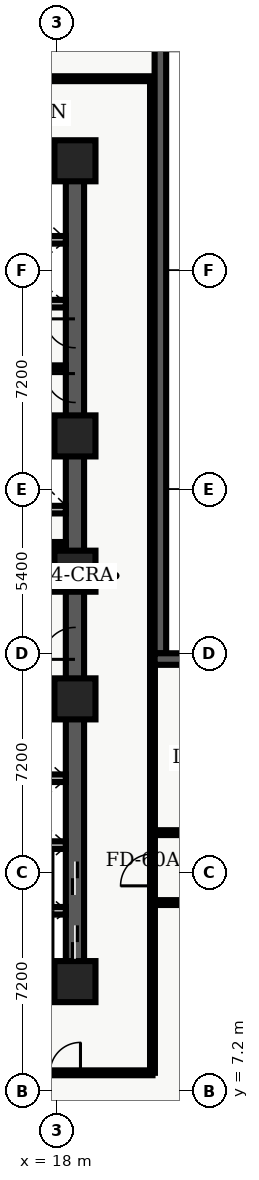
"""IFC4 building model, lengths in metres.
Left out: names, types, materials, properties, quantities, classifications, styles, units other than length and angle.
Written with IfcOpenShell. Run it as: python <this file> out.ifc"""

import sys

from ifc_helpers import new_model, entity, si_unit, converted_unit, direction, frame, origin_with_axes, origin_2d_with_axis, place, context, subcontext, project, spatial, polyline, rectangle, outline, extrude, element, fill, save


model = new_model("IFC4")
c1 = context("Model", 3, precision=1e-05, world=origin_with_axes(), true_north=direction((0.0, 1.0)))
c2 = subcontext(c1, "Body", "Model", "MODEL_VIEW")
j1 = project(units=[si_unit("LENGTHUNIT", "METRE"), converted_unit("PLANEANGLEUNIT", "DEGREE", entity("IfcPlaneAngleMeasure", 0.017), si_unit("PLANEANGLEUNIT", "RADIAN"), dimensions=[0, 0, 0, 0, 0, 0, 0])], contexts=[c1])
p1 = place(None, origin_with_axes())
s1 = spatial("IfcSite", under=j1, at=p1, CompositionType="ELEMENT")
p2 = place(p1, origin_with_axes())
s2 = spatial("IfcBuilding", under=s1, at=p2, CompositionType="ELEMENT")
p3 = place(p2, frame((0.0, 0.0, 60.0), z_axis=(0.0, 0.0, 1.0), x_axis=(1.0, 0.0, 0.0)))
s3 = spatial("IfcBuildingStorey", under=s2, at=p3, CompositionType="ELEMENT", Elevation=60.0)
p4 = place(p3, frame((11.4, 10.8, 0.0), z_axis=(0.0, 0.0, 1.0), x_axis=(1.0, 0.0, 0.0)))
e1 = element("IfcWall", 1, at=p4, inside=s3, PredefinedType="SHEAR", context=c2, shape_type="SweptSolid", body=[
    extrude(outline(polyline([(0.0, -0.3), (7.2, -0.3), (7.2, 0.3), (0.0, 0.3), (0.0, -0.3)])), origin_with_axes(), (0.0, 0.0, 1.0), 3.66),
])
p5 = place(p4, frame((2.625, 0.0, 0.0), z_axis=(0.0, 0.0, 1.0), x_axis=(1.0, 0.0, 0.0)))
e2 = element("IfcOpeningElement", 2, at=p5, cuts=e1, PredefinedType="OPENING", context=c2, shape_type="SweptSolid", body=[
    extrude(rectangle(XDim=1.05, YDim=0.62, at=origin_2d_with_axis()), origin_with_axes(), (0.0, 0.0, 1.0), 2.15),
])
p6 = place(p3, frame((11.4, 37.8, 0.0), z_axis=(0.0, 0.0, 1.0), x_axis=(1.0, 0.0, 0.0)))
e3 = element("IfcWall", 3, at=p6, inside=s3, PredefinedType="SHEAR", context=c2, shape_type="SweptSolid", body=[
    extrude(outline(polyline([(0.0, -0.3), (7.2, -0.3), (7.2, 0.3), (0.0, 0.3), (0.0, -0.3)])), origin_with_axes(), (0.0, 0.0, 1.0), 3.66),
])
p7 = place(p6, frame((2.625, 0.0, 0.0), z_axis=(0.0, 0.0, 1.0), x_axis=(1.0, 0.0, 0.0)))
e4 = element("IfcOpeningElement", 4, at=p7, cuts=e3, PredefinedType="OPENING", context=c2, shape_type="SweptSolid", body=[
    extrude(rectangle(XDim=1.05, YDim=0.62, at=origin_2d_with_axis()), origin_with_axes(), (0.0, 0.0, 1.0), 2.15),
])
p8 = place(p3, frame((18.6, 10.8, 0.0), z_axis=(0.0, 0.0, 1.0), x_axis=(0.0, 1.0, 0.0)))
e5 = element("IfcWall", 5, at=p8, inside=s3, PredefinedType="SHEAR", context=c2, shape_type="SweptSolid", body=[
    extrude(outline(polyline([(0.0, -0.3), (13.5, -0.3), (13.5, 0.3), (0.0, 0.3), (0.0, -0.3)])), origin_with_axes(), (0.0, 0.0, 1.0), 3.66),
])
p9 = place(p8, frame((1.3, 0.0, 0.0), z_axis=(0.0, 0.0, 1.0), x_axis=(1.0, 0.0, 0.0)))
e6 = element("IfcOpeningElement", 6, at=p9, cuts=e5, PredefinedType="OPENING", context=c2, shape_type="SweptSolid", body=[
    extrude(rectangle(XDim=1.1, YDim=0.62, at=origin_2d_with_axis()), origin_with_axes(), (0.0, 0.0, 1.0), 2.15),
])
p10 = place(p8, frame((3.4, 0.0, 0.0), z_axis=(0.0, 0.0, 1.0), x_axis=(1.0, 0.0, 0.0)))
e7 = element("IfcOpeningElement", 7, at=p10, cuts=e5, PredefinedType="OPENING", context=c2, shape_type="SweptSolid", body=[
    extrude(rectangle(XDim=1.1, YDim=0.62, at=origin_2d_with_axis()), origin_with_axes(), (0.0, 0.0, 1.0), 2.15),
])
p11 = place(p8, frame((11.125, 0.0, 0.0), z_axis=(0.0, 0.0, 1.0), x_axis=(1.0, 0.0, 0.0)))
e8 = element("IfcOpeningElement", 8, at=p11, cuts=e5, PredefinedType="OPENING", context=c2, shape_type="SweptSolid", body=[
    extrude(rectangle(XDim=1.05, YDim=0.62, at=origin_2d_with_axis()), origin_with_axes(), (0.0, 0.0, 1.0), 2.15),
])
p12 = place(p3, frame((18.6, 24.3, 0.0), z_axis=(0.0, 0.0, 1.0), x_axis=(0.0, 1.0, 0.0)))
e9 = element("IfcWall", 9, at=p12, inside=s3, PredefinedType="SHEAR", context=c2, shape_type="SweptSolid", body=[
    extrude(outline(polyline([(0.0, -0.3), (13.5, -0.3), (13.5, 0.3), (0.0, 0.3), (0.0, -0.3)])), origin_with_axes(), (0.0, 0.0, 1.0), 3.66),
])
p13 = place(p12, frame((6.025, 0.0, 0.0), z_axis=(0.0, 0.0, 1.0), x_axis=(1.0, 0.0, 0.0)))
e10 = element("IfcOpeningElement", 10, at=p13, cuts=e9, PredefinedType="OPENING", context=c2, shape_type="SweptSolid", body=[
    extrude(rectangle(XDim=0.95, YDim=0.62, at=origin_2d_with_axis()), origin_with_axes(), (0.0, 0.0, 1.0), 2.15),
])
p14 = place(p12, frame((7.825, 0.0, 0.0), z_axis=(0.0, 0.0, 1.0), x_axis=(1.0, 0.0, 0.0)))
e11 = element("IfcOpeningElement", 11, at=p14, cuts=e9, PredefinedType="OPENING", context=c2, shape_type="SweptSolid", body=[
    extrude(rectangle(XDim=0.95, YDim=0.62, at=origin_2d_with_axis()), origin_with_axes(), (0.0, 0.0, 1.0), 2.15),
])
for number, where, z_axis, x_axis in (
    (12, (11.7, 19.825, 0.0), (0.0, 0.0, 1.0), (1.0, 0.0, 0.0)),
    (13, (11.7, 28.775, 0.0), (0.0, 0.0, 1.0), (1.0, 0.0, 0.0)),
):
    element("IfcWall", number, at=place(p3, frame(where, z_axis=z_axis, x_axis=x_axis)), inside=s3, PredefinedType="SHEAR", context=c2, shape_type="SweptSolid", body=[
        extrude(outline(polyline([(0.0, -0.125), (6.6, -0.125), (6.6, 0.125), (0.0, 0.125), (0.0, -0.125)])), origin_with_axes(), (0.0, 0.0, 1.0), 3.66),
    ])
p15 = place(p3, frame((11.7, 24.1, 0.0), z_axis=(0.0, 0.0, 1.0), x_axis=(1.0, 0.0, 0.0)))
e14 = element("IfcWall", 14, at=p15, inside=s3, PredefinedType="SOLIDWALL", context=c2, shape_type="SweptSolid", body=[
    extrude(outline(polyline([(0.0, -0.125), (6.6, -0.125), (6.6, 0.125), (0.0, 0.125), (0.0, -0.125)])), origin_with_axes(), (0.0, 0.0, 1.0), 2.7),
])
p16 = place(p15, frame((3.75, 0.0, 0.0), z_axis=(0.0, 0.0, 1.0), x_axis=(1.0, 0.0, 0.0)))
e15 = element("IfcOpeningElement", 15, at=p16, cuts=e14, PredefinedType="OPENING", context=c2, shape_type="SweptSolid", body=[
    extrude(rectangle(XDim=0.9, YDim=0.27, at=origin_2d_with_axis()), origin_with_axes(), (0.0, 0.0, 1.0), 2.15),
])
p17 = place(p3, frame((11.7, 26.325, 0.0), z_axis=(0.0, 0.0, 1.0), x_axis=(1.0, 0.0, 0.0)))
e16 = element("IfcWall", 16, at=p17, inside=s3, PredefinedType="SOLIDWALL", context=c2, shape_type="SweptSolid", body=[
    extrude(outline(polyline([(0.0, -0.125), (6.6, -0.125), (6.6, 0.125), (0.0, 0.125), (0.0, -0.125)])), origin_with_axes(), (0.0, 0.0, 1.0), 2.7),
])
p18 = place(p17, frame((3.5, 0.0, 0.0), z_axis=(0.0, 0.0, 1.0), x_axis=(1.0, 0.0, 0.0)))
e17 = element("IfcOpeningElement", 17, at=p18, cuts=e16, PredefinedType="OPENING", context=c2, shape_type="SweptSolid", body=[
    extrude(rectangle(XDim=0.9, YDim=0.27, at=origin_2d_with_axis()), origin_with_axes(), (0.0, 0.0, 1.0), 2.15),
])
for number, where, z_axis, x_axis in (
    (18, (18.6, 10.8, 0.0), (0.0, 0.0, 1.0), (1.0, 0.0, 0.0)),
    (19, (18.6, 20.1, 0.0), (0.0, 0.0, 1.0), (1.0, 0.0, 0.0)),
    (20, (18.6, 24.3, 0.0), (0.0, 0.0, 1.0), (1.0, 0.0, 0.0)),
    (21, (18.6, 28.75, 0.0), (0.0, 0.0, 1.0), (1.0, 0.0, 0.0)),
    (22, (18.6, 37.8, 0.0), (0.0, 0.0, 1.0), (1.0, 0.0, 0.0)),
):
    element("IfcColumn", number, at=place(p3, frame(where, z_axis=z_axis, x_axis=x_axis)), inside=s3, PredefinedType="COLUMN", context=c2, shape_type="SweptSolid", body=[
        extrude(rectangle(XDim=1.35, YDim=1.35, at=origin_2d_with_axis()), origin_with_axes(), (0.0, 0.0, 1.0), 3.9),
    ])
p19 = place(p3, frame((14.62, 25.18, 0.0), z_axis=(0.0, 0.0, 1.0), x_axis=(1.0, 0.0, 0.0)))
e23 = element("IfcWall", 23, at=p19, inside=s3, PredefinedType="PARTITIONING", context=c2, shape_type="SweptSolid", body=[
    extrude(outline(polyline([(0.0, -0.08), (3.68, -0.08), (3.68, 0.08), (0.0, 0.08), (0.0, -0.08)])), origin_with_axes(), (0.0, 0.0, 1.0), 2.7),
])
p20 = place(p19, frame((1.95, 0.0, 0.0), z_axis=(0.0, 0.0, 1.0), x_axis=(1.0, 0.0, 0.0)))
e24 = element("IfcOpeningElement", 24, at=p20, cuts=e23, PredefinedType="OPENING", context=c2, shape_type="SweptSolid", body=[
    extrude(rectangle(XDim=0.9, YDim=0.18, at=origin_2d_with_axis()), origin_with_axes(), (0.0, 0.0, 1.0), 2.15),
])
for number, where, z_axis, x_axis in (
    (25, (15.84, 13.13, 0.0), (0.0, 0.0, 1.0), (1.0, 0.0, 0.0)),
    (26, (15.84, 15.29, 0.0), (0.0, 0.0, 1.0), (1.0, 0.0, 0.0)),
    (27, (15.84, 17.49, 0.0), (0.0, 0.0, 1.0), (1.0, 0.0, 0.0)),
    (28, (15.84, 33.1, 0.0), (0.0, 0.0, 1.0), (1.0, 0.0, 0.0)),
    (29, (15.84, 35.2, 0.0), (0.0, 0.0, 1.0), (1.0, 0.0, 0.0)),
):
    element("IfcWall", number, at=place(p3, frame(where, z_axis=z_axis, x_axis=x_axis)), inside=s3, PredefinedType="SOLIDWALL", context=c2, shape_type="SweptSolid", body=[
        extrude(outline(polyline([(0.0, -0.125), (2.46, -0.125), (2.46, 0.125), (0.0, 0.125), (0.0, -0.125)])), origin_with_axes(), (0.0, 0.0, 1.0), 2.7),
    ])
p21 = place(p3, frame((15.84, 31.0, 0.0), z_axis=(0.0, 0.0, 1.0), x_axis=(1.0, 0.0, 0.0)))
e30 = element("IfcWall", 30, at=p21, inside=s3, PredefinedType="PARTITIONING", context=c2, shape_type="SweptSolid", body=[
    extrude(outline(polyline([(0.0, -0.07), (2.46, -0.07), (2.46, 0.07), (0.0, 0.07), (0.0, -0.07)])), origin_with_axes(), (0.0, 0.0, 1.0), 2.7),
])
p22 = place(p3, frame((2.6, 7.8, 0.0), z_axis=(0.0, 0.0, 1.0), x_axis=(1.0, 0.0, 0.0)))
e31 = element("IfcWall", 31, at=p22, inside=s3, PredefinedType="PARTITIONING", context=c2, shape_type="SweptSolid", body=[
    extrude(outline(polyline([(0.0, -0.08), (18.55, -0.08), (18.55, 0.08), (0.0, 0.08), (0.0, -0.08)])), origin_with_axes(), (0.0, 0.0, 1.0), 2.7),
])
p23 = place(p22, frame((6.426, 0.0, 0.0), z_axis=(0.0, 0.0, 1.0), x_axis=(1.0, 0.0, 0.0)))
e32 = element("IfcOpeningElement", 32, at=p23, cuts=e31, PredefinedType="OPENING", context=c2, shape_type="SweptSolid", body=[
    extrude(rectangle(XDim=1.2, YDim=0.18, at=origin_2d_with_axis()), origin_with_axes(), (0.0, 0.0, 1.0), 2.2),
])
p24 = place(p22, frame((15.681, 0.0, 0.0), z_axis=(0.0, 0.0, 1.0), x_axis=(1.0, 0.0, 0.0)))
e33 = element("IfcOpeningElement", 33, at=p24, cuts=e31, PredefinedType="OPENING", context=c2, shape_type="SweptSolid", body=[
    extrude(rectangle(XDim=1.0, YDim=0.18, at=origin_2d_with_axis()), origin_with_axes(), (0.0, 0.0, 1.0), 2.15),
])
p25 = place(p3, frame((2.6, 40.5, 0.0), z_axis=(0.0, 0.0, 1.0), x_axis=(1.0, 0.0, 0.0)))
e34 = element("IfcWall", 34, at=p25, inside=s3, PredefinedType="PARTITIONING", context=c2, shape_type="SweptSolid", body=[
    extrude(outline(polyline([(0.0, -0.08), (18.65, -0.08), (18.65, 0.08), (0.0, 0.08), (0.0, -0.08)])), origin_with_axes(), (0.0, 0.0, 1.0), 2.7),
])
p26 = place(p25, frame((2.268, 0.0, 0.0), z_axis=(0.0, 0.0, 1.0), x_axis=(1.0, 0.0, 0.0)))
e35 = element("IfcOpeningElement", 35, at=p26, cuts=e34, PredefinedType="OPENING", context=c2, shape_type="SweptSolid", body=[
    extrude(rectangle(XDim=1.0, YDim=0.18, at=origin_2d_with_axis()), origin_with_axes(), (0.0, 0.0, 1.0), 2.15),
])
p27 = place(p25, frame((7.261, 0.0, 0.0), z_axis=(0.0, 0.0, 1.0), x_axis=(1.0, 0.0, 0.0)))
e36 = element("IfcOpeningElement", 36, at=p27, cuts=e34, PredefinedType="OPENING", context=c2, shape_type="SweptSolid", body=[
    extrude(rectangle(XDim=1.0, YDim=0.18, at=origin_2d_with_axis()), origin_with_axes(), (0.0, 0.0, 1.0), 2.15),
])
p28 = place(p25, frame((13.197, 0.0, 0.0), z_axis=(0.0, 0.0, 1.0), x_axis=(1.0, 0.0, 0.0)))
e37 = element("IfcOpeningElement", 37, at=p28, cuts=e34, PredefinedType="OPENING", context=c2, shape_type="SweptSolid", body=[
    extrude(rectangle(XDim=1.0, YDim=0.18, at=origin_2d_with_axis()), origin_with_axes(), (0.0, 0.0, 1.0), 2.15),
])
p29 = place(p3, frame((21.15, 7.8, 0.0), z_axis=(0.0, 0.0, 1.0), x_axis=(0.0, 1.0, 0.0)))
e38 = element("IfcWall", 38, at=p29, inside=s3, PredefinedType="PARTITIONING", context=c2, shape_type="SweptSolid", body=[
    extrude(outline(polyline([(0.0, -0.08), (32.7, -0.08), (32.7, 0.08), (0.0, 0.08), (0.0, -0.08)])), origin_with_axes(), (0.0, 0.0, 1.0), 2.7),
])
p30 = place(p29, frame((6.675, 0.0, 0.0), z_axis=(0.0, 0.0, 1.0), x_axis=(1.0, 0.0, 0.0)))
e39 = element("IfcOpeningElement", 39, at=p30, cuts=e38, PredefinedType="OPENING", context=c2, shape_type="SweptSolid", body=[
    extrude(rectangle(XDim=1.05, YDim=0.18, at=origin_2d_with_axis()), origin_with_axes(), (0.0, 0.0, 1.0), 2.15),
])
p31 = place(p3, frame((21.15, 13.4, 0.0), z_axis=(0.0, 0.0, 1.0), x_axis=(1.0, 0.0, 0.0)))
e40 = element("IfcWall", 40, at=p31, inside=s3, PredefinedType="PARTITIONING", context=c2, shape_type="SweptSolid", body=[
    extrude(outline(polyline([(0.0, -0.08), (15.2, -0.08), (15.2, 0.08), (0.0, 0.08), (0.0, -0.08)])), origin_with_axes(), (0.0, 0.0, 1.0), 2.7),
])
p32 = place(p31, frame((2.829, 0.0, 0.0), z_axis=(0.0, 0.0, 1.0), x_axis=(1.0, 0.0, 0.0)))
e41 = element("IfcOpeningElement", 41, at=p32, cuts=e40, PredefinedType="OPENING", context=c2, shape_type="SweptSolid", body=[
    extrude(rectangle(XDim=1.0, YDim=0.18, at=origin_2d_with_axis()), origin_with_axes(), (0.0, 0.0, 1.0), 2.15),
])
p33 = place(p31, frame((8.536, 0.0, 0.0), z_axis=(0.0, 0.0, 1.0), x_axis=(1.0, 0.0, 0.0)))
e42 = element("IfcOpeningElement", 42, at=p33, cuts=e40, PredefinedType="OPENING", context=c2, shape_type="SweptSolid", body=[
    extrude(rectangle(XDim=1.2, YDim=0.18, at=origin_2d_with_axis()), origin_with_axes(), (0.0, 0.0, 1.0), 2.2),
])
p34 = place(p31, frame((13.076, 0.0, 0.0), z_axis=(0.0, 0.0, 1.0), x_axis=(1.0, 0.0, 0.0)))
e43 = element("IfcOpeningElement", 43, at=p34, cuts=e40, PredefinedType="OPENING", context=c2, shape_type="SweptSolid", body=[
    extrude(rectangle(XDim=1.0, YDim=0.18, at=origin_2d_with_axis()), origin_with_axes(), (0.0, 0.0, 1.0), 2.15),
])
p35 = place(p3, frame((21.15, 15.7, 0.0), z_axis=(0.0, 0.0, 1.0), x_axis=(1.0, 0.0, 0.0)))
e44 = element("IfcWall", 44, at=p35, inside=s3, PredefinedType="PARTITIONING", context=c2, shape_type="SweptSolid", body=[
    extrude(outline(polyline([(0.0, -0.08), (15.2, -0.08), (15.2, 0.08), (0.0, 0.08), (0.0, -0.08)])), origin_with_axes(), (0.0, 0.0, 1.0), 2.7),
])
p36 = place(p35, frame((3.468, 0.0, 0.0), z_axis=(0.0, 0.0, 1.0), x_axis=(1.0, 0.0, 0.0)))
e45 = element("IfcOpeningElement", 45, at=p36, cuts=e44, PredefinedType="OPENING", context=c2, shape_type="SweptSolid", body=[
    extrude(rectangle(XDim=1.0, YDim=0.18, at=origin_2d_with_axis()), origin_with_axes(), (0.0, 0.0, 1.0), 2.15),
])
p37 = place(p35, frame((10.938, 0.0, 0.0), z_axis=(0.0, 0.0, 1.0), x_axis=(1.0, 0.0, 0.0)))
e46 = element("IfcOpeningElement", 46, at=p37, cuts=e44, PredefinedType="OPENING", context=c2, shape_type="SweptSolid", body=[
    extrude(rectangle(XDim=1.0, YDim=0.18, at=origin_2d_with_axis()), origin_with_axes(), (0.0, 0.0, 1.0), 2.15),
])
p38 = place(p3, frame((21.41, 45.82, 0.0), z_axis=(0.0, 0.0, 1.0), x_axis=(0.0, -1.0, 0.0)))
e47 = element("IfcWall", 47, at=p38, inside=s3, PredefinedType="SOLIDWALL", context=c2, shape_type="SweptSolid", body=[
    extrude(outline(polyline([(0.0, -0.19), (24.22, -0.19), (24.22, 0.19), (0.0, 0.19), (0.0, -0.19)])), origin_with_axes(), (0.0, 0.0, 1.0), 3.66),
])
p39 = place(p38, frame((2.902, 0.0, 0.45), z_axis=(0.0, 0.0, 1.0), x_axis=(1.0, 0.0, 0.0)))
e48 = element("IfcOpeningElement", 48, at=p39, cuts=e47, PredefinedType="OPENING", context=c2, shape_type="SweptSolid", body=[
    extrude(rectangle(XDim=2.1, YDim=0.4, at=origin_2d_with_axis()), origin_with_axes(), (0.0, 0.0, 1.0), 2.2),
])
p40 = place(p3, frame((21.22, 21.41, 0.0), z_axis=(0.0, 0.0, 1.0), x_axis=(1.0, 0.0, 0.0)))
e49 = element("IfcWall", 49, at=p40, inside=s3, PredefinedType="SOLIDWALL", context=c2, shape_type="SweptSolid", body=[
    extrude(outline(polyline([(0.0, -0.19), (17.18, -0.19), (17.18, 0.19), (0.0, 0.19), (0.0, -0.19)])), origin_with_axes(), (0.0, 0.0, 1.0), 3.66),
])
p41 = place(p40, frame((3.263, 0.0, 0.45), z_axis=(0.0, 0.0, 1.0), x_axis=(1.0, 0.0, 0.0)))
e50 = element("IfcOpeningElement", 50, at=p41, cuts=e49, PredefinedType="OPENING", context=c2, shape_type="SweptSolid", body=[
    extrude(rectangle(XDim=2.1, YDim=0.4, at=origin_2d_with_axis()), origin_with_axes(), (0.0, 0.0, 1.0), 2.2),
])
p42 = place(p40, frame((8.59, 0.0, 0.45), z_axis=(0.0, 0.0, 1.0), x_axis=(1.0, 0.0, 0.0)))
e51 = element("IfcOpeningElement", 51, at=p42, cuts=e49, PredefinedType="OPENING", context=c2, shape_type="SweptSolid", body=[
    extrude(rectangle(XDim=2.1, YDim=0.4, at=origin_2d_with_axis()), origin_with_axes(), (0.0, 0.0, 1.0), 2.2),
])
p43 = place(p40, frame((13.467, 0.0, 0.45), z_axis=(0.0, 0.0, 1.0), x_axis=(1.0, 0.0, 0.0)))
e52 = element("IfcOpeningElement", 52, at=p43, cuts=e49, PredefinedType="OPENING", context=c2, shape_type="SweptSolid", body=[
    extrude(rectangle(XDim=2.1, YDim=0.4, at=origin_2d_with_axis()), origin_with_axes(), (0.0, 0.0, 1.0), 2.2),
])
p44 = place(p8, frame((1.3, 0.0, 0.0), z_axis=(0.0, 0.0, 1.0), x_axis=(1.0, 0.0, 0.0)))
e53 = element("IfcDoor", 53, at=p44, inside=s3, OperationType="SLIDING_TO_LEFT", PredefinedType="DOOR", context=c2, shape_type="SweptSolid", body=[
    extrude(rectangle(XDim=1.1, YDim=0.09, at=origin_2d_with_axis()), origin_with_axes(), (0.0, 0.0, 1.0), 2.15),
])
fill(e6, e53)
p45 = place(p8, frame((3.4, 0.0, 0.0), z_axis=(0.0, 0.0, 1.0), x_axis=(1.0, 0.0, 0.0)))
e54 = element("IfcDoor", 54, at=p45, inside=s3, OperationType="SLIDING_TO_RIGHT", PredefinedType="DOOR", context=c2, shape_type="SweptSolid", body=[
    extrude(rectangle(XDim=1.1, YDim=0.09, at=origin_2d_with_axis()), origin_with_axes(), (0.0, 0.0, 1.0), 2.15),
])
fill(e7, e54)
p46 = place(p8, frame((11.125, 0.0, 0.0), z_axis=(0.0, 0.0, 1.0), x_axis=(1.0, 0.0, 0.0)))
e55 = element("IfcDoor", 55, at=p46, inside=s3, OperationType="SINGLE_SWING_LEFT", PredefinedType="DOOR", context=c2, shape_type="SweptSolid", body=[
    extrude(rectangle(XDim=1.05, YDim=0.09, at=origin_2d_with_axis()), origin_with_axes(), (0.0, 0.0, 1.0), 2.15),
])
fill(e8, e55)
p47 = place(p12, frame((6.025, 0.0, 0.0), z_axis=(0.0, 0.0, 1.0), x_axis=(1.0, 0.0, 0.0)))
e56 = element("IfcDoor", 56, at=p47, inside=s3, OperationType="SINGLE_SWING_RIGHT", PredefinedType="DOOR", context=c2, shape_type="SweptSolid", body=[
    extrude(rectangle(XDim=0.95, YDim=0.09, at=origin_2d_with_axis()), origin_with_axes(), (0.0, 0.0, 1.0), 2.15),
])
fill(e10, e56)
p48 = place(p12, frame((7.825, 0.0, 0.0), z_axis=(0.0, 0.0, 1.0), x_axis=(1.0, 0.0, 0.0)))
e57 = element("IfcDoor", 57, at=p48, inside=s3, OperationType="SINGLE_SWING_RIGHT", PredefinedType="DOOR", context=c2, shape_type="SweptSolid", body=[
    extrude(rectangle(XDim=0.95, YDim=0.09, at=origin_2d_with_axis()), origin_with_axes(), (0.0, 0.0, 1.0), 2.15),
])
fill(e11, e57)
p49 = place(p22, frame((15.681, 0.0, 0.0), z_axis=(0.0, 0.0, 1.0), x_axis=(1.0, 0.0, 0.0)))
e58 = element("IfcDoor", 58, at=p49, inside=s3, OperationType="SINGLE_SWING_RIGHT", PredefinedType="DOOR", context=c2, shape_type="SweptSolid", body=[
    extrude(rectangle(XDim=1.0, YDim=0.09, at=origin_2d_with_axis()), origin_with_axes(), (0.0, 0.0, 1.0), 2.15),
])
fill(e33, e58)
p50 = place(p29, frame((6.675, 0.0, 0.0), z_axis=(0.0, 0.0, 1.0), x_axis=(1.0, 0.0, 0.0)))
e59 = element("IfcDoor", 59, at=p50, inside=s3, OperationType="SINGLE_SWING_LEFT", PredefinedType="DOOR", context=c2, shape_type="SweptSolid", body=[
    extrude(rectangle(XDim=1.05, YDim=0.09, at=origin_2d_with_axis()), origin_with_axes(), (0.0, 0.0, 1.0), 2.15),
])
fill(e39, e59)
save(model, sys.argv[1])
